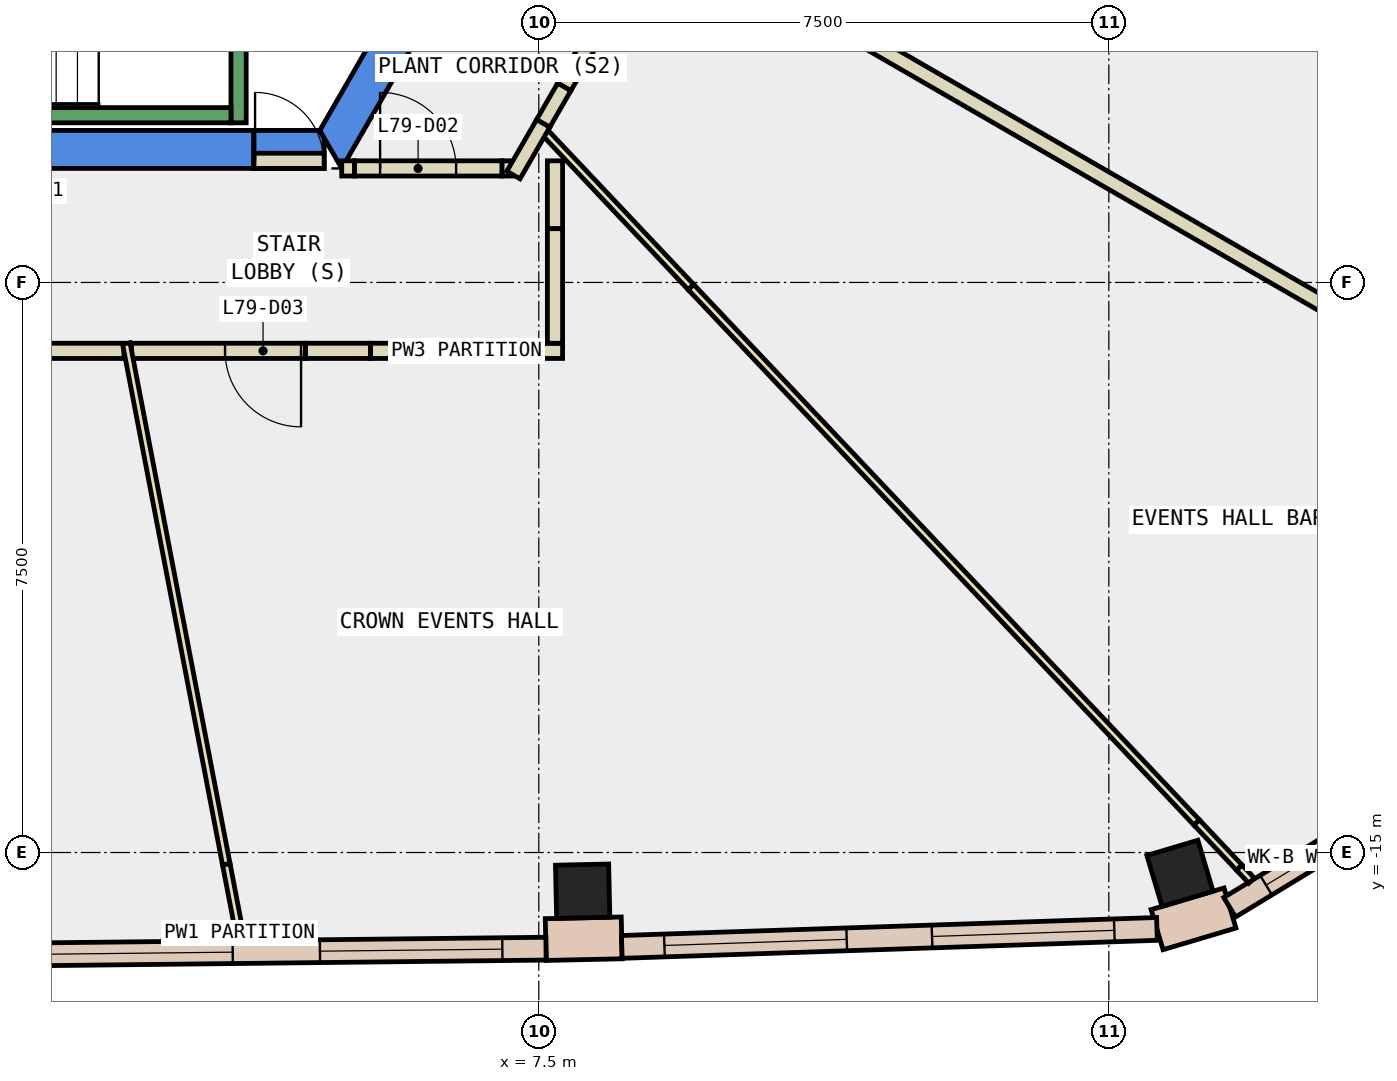
"""IFC4 building model, lengths in metres.
Left out: names, types, materials, properties, quantities, classifications, styles, units other than length and angle.
Written with IfcOpenShell. Run it as: python <this file> out.ifc"""

import sys

from ifc_helpers import new_model, si_unit, direction, frame, frame_2d, origin, origin_2d, place, context, subcontext, project, spatial, polyline, rectangle, outline, extrude, element, fill, save


model = new_model("IFC4")
c1 = context("Model", 3, precision=1e-05, world=origin(), true_north=direction((0.0, 1.0)))
c2 = subcontext(c1, "Body", "Model", "MODEL_VIEW")
j1 = project(units=[si_unit("LENGTHUNIT", "METRE"), si_unit("PLANEANGLEUNIT", "RADIAN")], contexts=[c1])
p1 = place(None, origin())
s1 = spatial("IfcSite", under=j1, at=p1, CompositionType="ELEMENT")
p2 = place(p1, origin())
s2 = spatial("IfcBuilding", under=s1, at=p2, CompositionType="ELEMENT")
p3 = place(p2, frame((0.0, 0.0, 335.9)))
s3 = spatial("IfcBuildingStorey", under=s2, at=p3, CompositionType="ELEMENT", Elevation=335.9)
for number, where, z_axis, x_axis in (
    (1, (8.077, -15.509, -0.35), (0.0, 0.0, 1.0), (1.0, 0.022, 0.0)),
    (2, (15.936, -15.274, -0.35), (0.0, 0.0, 1.0), (0.958, 0.286, 0.0)),
):
    element("IfcColumn", number, at=place(p3, frame(where, z_axis=z_axis, x_axis=x_axis)), inside=s3, PredefinedType="COLUMN", context=c2, shape_type="SweptSolid", body=[
        extrude(rectangle(XDim=0.7, YDim=0.7, at=origin_2d()), origin(), (0.0, 0.0, 1.0), 4.4),
    ])
p4 = place(p3, frame((0.0, 0.0, -0.35)))
e3 = element("IfcWall", 3, at=p4, inside=s3, PredefinedType="SHEAR", context=c2, shape_type="SweptSolid", body=[
    extrude(outline(polyline([(3.75, -6.0), (3.75, -5.5), (-4.619, -5.5), (-4.907, -6.0), (3.75, -6.0)])), origin(), (0.0, 0.0, 1.0), 4.4),
])
p5 = place(p3, frame((0.0, 0.0, 3.6)))
e4 = element("IfcWall", 4, at=p5, inside=s3, PredefinedType="SHEAR", context=c2, shape_type="SweptSolid", body=[
    extrude(outline(polyline([(4.676, -6.0), (4.676, -5.6), (4.619, -5.5), (3.75, -5.5), (3.75, -6.0), (4.676, -6.0)])), origin(), (0.0, 0.0, 1.0), 0.45),
])
p6 = place(p3, frame((0.0, 0.0, -0.35)))
e5 = element("IfcWall", 5, at=p6, inside=s3, PredefinedType="SHEAR", context=c2, shape_type="SweptSolid", body=[
    extrude(outline(polyline([(4.907, -6.0), (9.815, 2.5), (9.238, 2.5), (4.619, -5.5), (4.907, -6.0)])), origin(), (0.0, 0.0, 1.0), 4.4),
])
p7 = place(p3, frame((7.591, -16.145, 0.0), z_axis=(0.0, 0.0, 1.0), x_axis=(0.999758688564, 0.021967353997, 0.0)))
e6 = element("IfcWall", 6, at=p7, inside=s3, PredefinedType="STANDARD", context=c2, shape_type="SweptSolid", body=[
    extrude(rectangle(XDim=1.0, YDim=0.55, at=frame_2d((0.5, 0.0))), origin(), (0.0, 0.0, 1.0), 4.05),
])
p8 = place(p3, frame((15.635, -16.015, 0.0), z_axis=(0.0, 0.0, 1.0), x_axis=(0.958588587629, 0.284794521834, 0.0)))
e7 = element("IfcWall", 7, at=p8, inside=s3, PredefinedType="STANDARD", context=c2, shape_type="SweptSolid", body=[
    extrude(rectangle(XDim=1.0, YDim=0.55, at=frame_2d((0.5, 0.0))), origin(), (0.0, 0.0, 1.0), 4.05),
])
p9 = place(p3, frame((0.499, -16.344, 0.0), z_axis=(0.0, 0.0, 1.0), x_axis=(0.999937873213, 0.011146735624, 0.0)))
e8 = element("IfcWall", 8, at=p9, inside=s3, PredefinedType="STANDARD", context=c2, shape_type="SweptSolid", body=[
    extrude(rectangle(XDim=7.096, YDim=0.3, at=frame_2d((3.548, 0.0))), origin(), (0.0, 0.0, 1.0), 4.05),
])
p10 = place(p9, frame((0.574, 0.0, 0.9)))
e9 = element("IfcOpeningElement", 9, at=p10, cuts=e8, PredefinedType="OPENING", context=c2, shape_type="SweptSolid", body=[
    extrude(rectangle(XDim=2.4, YDim=3.0, at=frame_2d((1.2, 1.5))), frame((0.0, 0.16, 0.0), z_axis=(0.0, -1.0, 0.0), x_axis=(1.0, 0.0, 0.0)), (0.0, 0.0, 1.0), 0.32),
])
p11 = place(p9, frame((4.122, 0.0, 0.9)))
e10 = element("IfcOpeningElement", 10, at=p11, cuts=e8, PredefinedType="OPENING", context=c2, shape_type="SweptSolid", body=[
    extrude(rectangle(XDim=2.4, YDim=3.0, at=frame_2d((1.2, 1.5))), frame((0.0, 0.16, 0.0), z_axis=(0.0, -1.0, 0.0), x_axis=(1.0, 0.0, 0.0)), (0.0, 0.0, 1.0), 0.32),
])
p12 = place(p3, frame((8.592, -16.242, 0.0), z_axis=(0.0, 0.0, 1.0), x_axis=(0.999433696929, 0.033649449366, 0.0)))
e11 = element("IfcWall", 11, at=p12, inside=s3, PredefinedType="STANDARD", context=c2, shape_type="SweptSolid", body=[
    extrude(rectangle(XDim=7.045, YDim=0.3, at=frame_2d((3.522, 0.0))), origin(), (0.0, 0.0, 1.0), 4.05),
])
p13 = place(p12, frame((0.561, 0.0, 0.9)))
e12 = element("IfcOpeningElement", 12, at=p13, cuts=e11, PredefinedType="OPENING", context=c2, shape_type="SweptSolid", body=[
    extrude(rectangle(XDim=2.4, YDim=3.0, at=frame_2d((1.2, 1.5))), frame((0.0, 0.16, 0.0), z_axis=(0.0, -1.0, 0.0), x_axis=(1.0, 0.0, 0.0)), (0.0, 0.0, 1.0), 0.32),
])
p14 = place(p12, frame((4.084, 0.0, 0.9)))
e13 = element("IfcOpeningElement", 13, at=p14, cuts=e11, PredefinedType="OPENING", context=c2, shape_type="SweptSolid", body=[
    extrude(rectangle(XDim=2.4, YDim=3.0, at=frame_2d((1.2, 1.5))), frame((0.0, 0.16, 0.0), z_axis=(0.0, -1.0, 0.0), x_axis=(1.0, 0.0, 0.0)), (0.0, 0.0, 1.0), 0.32),
])
p15 = place(p3, frame((16.59, -15.72, 0.0), z_axis=(0.0, 0.0, 1.0), x_axis=(0.854607095238, 0.519275180197, 0.0)))
e14 = element("IfcWall", 14, at=p15, inside=s3, PredefinedType="STANDARD", context=c2, shape_type="SweptSolid", body=[
    extrude(rectangle(XDim=5.04, YDim=0.3, at=frame_2d((2.52, 0.0))), origin(), (0.0, 0.0, 1.0), 4.05),
])
p16 = place(p15, frame((0.56, 0.0, 0.9)))
e15 = element("IfcOpeningElement", 15, at=p16, cuts=e14, PredefinedType="OPENING", context=c2, shape_type="SweptSolid", body=[
    extrude(rectangle(XDim=1.4, YDim=3.0, at=frame_2d((0.7, 1.5))), frame((0.0, 0.16, 0.0), z_axis=(0.0, -1.0, 0.0), x_axis=(1.0, 0.0, 0.0)), (0.0, 0.0, 1.0), 0.32),
])
p17 = place(p15, frame((3.08, 0.0, 0.9)))
e16 = element("IfcOpeningElement", 16, at=p17, cuts=e14, PredefinedType="OPENING", context=c2, shape_type="SweptSolid", body=[
    extrude(rectangle(XDim=1.4, YDim=3.0, at=frame_2d((0.7, 1.5))), frame((0.0, 0.16, 0.0), z_axis=(0.0, -1.0, 0.0), x_axis=(1.0, 0.0, 0.0)), (0.0, 0.0, 1.0), 0.32),
])
p18 = place(p3, frame((4.907, -6.0, 0.0), z_axis=(0.0, 0.0, 1.0), x_axis=(1.0, 0.0, 0.0)))
e17 = element("IfcWall", 17, at=p18, inside=s3, PredefinedType="PARTITIONING", context=c2, shape_type="SweptSolid", body=[
    extrude(rectangle(XDim=0.169, YDim=0.2, at=frame_2d((0.084, 0.0))), origin(), (0.0, 0.0, 1.0), 2.4),
])
p19 = place(p3, frame((7.813, -8.4, 0.0), z_axis=(0.0, 0.0, 1.0), x_axis=(-1.0, 0.0, 0.0)))
e18 = element("IfcWall", 18, at=p19, inside=s3, PredefinedType="PARTITIONING", context=c2, shape_type="SweptSolid", body=[
    extrude(rectangle(XDim=2.528, YDim=0.2, at=frame_2d((1.264, 0.0))), origin(), (0.0, 0.0, 1.0), 4.05),
])
p20 = place(p3, frame((7.713, -5.9, 0.0), z_axis=(0.0, 0.0, 1.0), x_axis=(0.0, -1.0, 0.0)))
e19 = element("IfcWall", 19, at=p20, inside=s3, PredefinedType="PARTITIONING", context=c2, shape_type="SweptSolid", body=[
    extrude(rectangle(XDim=0.893, YDim=0.2, at=frame_2d((0.447, 0.0))), origin(), (0.0, 0.0, 1.0), 1.95),
])
p21 = place(p3, frame((2.042, -8.4, 0.0), z_axis=(0.0, 0.0, 1.0), x_axis=(-1.0, 0.0, 0.0)))
e20 = element("IfcWall", 20, at=p21, inside=s3, PredefinedType="PARTITIONING", context=c2, shape_type="SweptSolid", body=[
    extrude(rectangle(XDim=1.429, YDim=0.2, at=frame_2d((0.714, 0.0))), origin(), (0.0, 0.0, 1.0), 4.05),
])
p22 = place(p3, frame((3.581, -16.159, 0.0), z_axis=(0.0, 0.0, 1.0), x_axis=(-0.186880008506, 0.982382747416, 0.0)))
e21 = element("IfcWall", 21, at=p22, inside=s3, PredefinedType="PARTITIONING", context=c2, shape_type="SweptSolid", body=[
    extrude(rectangle(XDim=0.193, YDim=0.1, at=frame_2d((0.097, 0.0))), origin(), (0.0, 0.0, 1.0), 4.05),
])
p23 = place(p3, frame((7.524, -5.467, 0.0), z_axis=(0.0, 0.0, 1.0), x_axis=(0.686690726235, -0.726949686363, 0.0)))
e22 = element("IfcWall", 22, at=p23, inside=s3, PredefinedType="PARTITIONING", context=c2, shape_type="SweptSolid", body=[
    extrude(rectangle(XDim=2.881, YDim=0.1, at=frame_2d((1.44, 0.0))), origin(), (0.0, 0.0, 1.0), 1.95),
])
p24 = place(p3, frame((9.006, -2.7, 0.0), z_axis=(0.0, 0.0, 1.0), x_axis=(0.86601643423, -0.500015535402, 0.0)))
e23 = element("IfcWall", 23, at=p24, inside=s3, PredefinedType="PARTITIONING", context=c2, shape_type="SweptSolid", body=[
    extrude(rectangle(XDim=13.147, YDim=0.2, at=frame_2d((6.574, 0.0))), origin(), (0.0, 0.0, 1.0), 4.05),
])
p25 = place(p3, frame((3.75, -5.9, 0.0), z_axis=(0.0, 0.0, 1.0), x_axis=(1.0, 0.0, 0.0)))
e24 = element("IfcWall", 24, at=p25, inside=s3, PredefinedType="PARTITIONING", context=c2, shape_type="SweptSolid", body=[
    extrude(rectangle(XDim=0.926, YDim=0.2, at=frame_2d((0.463, 0.0))), origin(), (0.0, 0.0, 1.0), 2.4),
])
p26 = place(p25, frame((0.017, 0.0, 0.0)))
e25 = element("IfcOpeningElement", 25, at=p26, cuts=e24, PredefinedType="OPENING", context=c2, shape_type="SweptSolid", body=[
    extrude(rectangle(XDim=0.9, YDim=2.1, at=frame_2d((0.45, 1.05))), frame((0.0, 0.11, 0.0), z_axis=(0.0, -1.0, 0.0), x_axis=(1.0, 0.0, 0.0)), (0.0, 0.0, 1.0), 0.22),
])
p27 = place(p3, frame((5.076, -6.0, 0.0), z_axis=(0.0, 0.0, 1.0), x_axis=(1.0, 0.0, 0.0)))
e26 = element("IfcWall", 26, at=p27, inside=s3, PredefinedType="PARTITIONING", context=c2, shape_type="SweptSolid", body=[
    extrude(rectangle(XDim=1.941, YDim=0.2, at=frame_2d((0.971, 0.0))), origin(), (0.0, 0.0, 1.0), 4.05),
])
p28 = place(p27, frame((0.336, 0.0, 0.0)))
e27 = element("IfcOpeningElement", 27, at=p28, cuts=e26, PredefinedType="OPENING", context=c2, shape_type="SweptSolid", body=[
    extrude(rectangle(XDim=1.0, YDim=2.1, at=frame_2d((0.5, 1.05))), frame((0.0, 0.11, 0.0), z_axis=(0.0, -1.0, 0.0), x_axis=(1.0, 0.0, 0.0)), (0.0, 0.0, 1.0), 0.22),
])
p29 = place(p3, frame((7.017, -6.0, 0.0), z_axis=(0.0, 0.0, 1.0), x_axis=(1.0, 0.0, 0.0)))
e28 = element("IfcWall", 28, at=p29, inside=s3, PredefinedType="PARTITIONING", context=c2, shape_type="SweptSolid", body=[
    extrude(rectangle(XDim=0.144, YDim=0.2, at=frame_2d((0.072, 0.0))), origin(), (0.0, 0.0, 1.0), 1.95),
])
p30 = place(p3, frame((5.285, -8.4, 0.0), z_axis=(0.0, 0.0, 1.0), x_axis=(-1.0, 0.0, 0.0)))
e29 = element("IfcWall", 29, at=p30, inside=s3, PredefinedType="PARTITIONING", context=c2, shape_type="SweptSolid", body=[
    extrude(rectangle(XDim=0.856, YDim=0.2, at=frame_2d((0.428, 0.0))), origin(), (0.0, 0.0, 1.0), 1.95),
])
p31 = place(p3, frame((4.429, -8.4, 0.0), z_axis=(0.0, 0.0, 1.0), x_axis=(-1.0, 0.0, 0.0)))
e30 = element("IfcWall", 30, at=p31, inside=s3, PredefinedType="PARTITIONING", context=c2, shape_type="SweptSolid", body=[
    extrude(rectangle(XDim=2.287, YDim=0.2, at=frame_2d((1.144, 0.0))), origin(), (0.0, 0.0, 1.0), 4.05),
])
p32 = place(p31, frame((0.057, 0.0, 0.0)))
e31 = element("IfcOpeningElement", 31, at=p32, cuts=e30, PredefinedType="OPENING", context=c2, shape_type="SweptSolid", body=[
    extrude(rectangle(XDim=1.0, YDim=2.1, at=frame_2d((0.5, 1.05))), frame((0.0, 0.11, 0.0), z_axis=(0.0, -1.0, 0.0), x_axis=(1.0, 0.0, 0.0)), (0.0, 0.0, 1.0), 0.22),
])
p33 = place(p3, frame((7.713, -6.793, 0.0), z_axis=(0.0, 0.0, 1.0), x_axis=(0.0, -1.0, 0.0)))
e32 = element("IfcWall", 32, at=p33, inside=s3, PredefinedType="PARTITIONING", context=c2, shape_type="SweptSolid", body=[
    extrude(rectangle(XDim=1.507, YDim=0.2, at=frame_2d((0.753, 0.0))), origin(), (0.0, 0.0, 1.0), 4.05),
])
p34 = place(p3, frame((8.185, -4.322, 0.0), z_axis=(0.0, 0.0, 1.0), x_axis=(-0.500265973451, -0.865871789474, 0.0)))
e33 = element("IfcWall", 33, at=p34, inside=s3, PredefinedType="PARTITIONING", context=c2, shape_type="SweptSolid", body=[
    extrude(rectangle(XDim=0.7, YDim=0.2, at=frame_2d((0.35, 0.0))), origin(), (0.0, 0.0, 1.0), 1.95),
])
p35 = place(p3, frame((7.835, -4.928, 0.0), z_axis=(0.0, 0.0, 1.0), x_axis=(-0.499646164767, -0.866229594296, 0.0)))
e34 = element("IfcWall", 34, at=p35, inside=s3, PredefinedType="PARTITIONING", context=c2, shape_type="SweptSolid", body=[
    extrude(rectangle(XDim=0.554, YDim=0.2, at=frame_2d((0.277, 0.0))), origin(), (0.0, 0.0, 1.0), 4.05),
])
p36 = place(p3, frame((7.558, -5.408, 0.0), z_axis=(0.0, 0.0, 1.0), x_axis=(-0.500090821976, -0.865972961342, 0.0)))
e35 = element("IfcWall", 35, at=p36, inside=s3, PredefinedType="PARTITIONING", context=c2, shape_type="SweptSolid", body=[
    extrude(rectangle(XDim=0.784, YDim=0.2, at=frame_2d((0.392, 0.0))), origin(), (0.0, 0.0, 1.0), 1.95),
])
p37 = place(p3, frame((3.545, -15.969, 0.0), z_axis=(0.0, 0.0, 1.0), x_axis=(-0.188934578713, 0.981989676609, 0.0)))
e36 = element("IfcWall", 36, at=p37, inside=s3, PredefinedType="PARTITIONING", context=c2, shape_type="SweptSolid", body=[
    extrude(rectangle(XDim=0.831, YDim=0.1, at=frame_2d((0.416, 0.0))), origin(), (0.0, 0.0, 1.0), 1.95),
])
p38 = place(p3, frame((3.388, -15.153, 0.0), z_axis=(0.0, 0.0, 1.0), x_axis=(-0.18849172388, 0.982074778227, 0.0)))
e37 = element("IfcWall", 37, at=p38, inside=s3, PredefinedType="PARTITIONING", context=c2, shape_type="SweptSolid", body=[
    extrude(rectangle(XDim=6.976, YDim=0.1, at=frame_2d((3.488, 0.0))), origin(), (0.0, 0.0, 1.0), 4.05),
])
p39 = place(p3, frame((9.502, -7.561, 0.0), z_axis=(0.0, 0.0, 1.0), x_axis=(0.686701951344, -0.726939082744, 0.0)))
e38 = element("IfcWall", 38, at=p39, inside=s3, PredefinedType="PARTITIONING", context=c2, shape_type="SweptSolid", body=[
    extrude(rectangle(XDim=9.69, YDim=0.1, at=frame_2d((4.845, 0.0))), origin(), (0.0, 0.0, 1.0), 4.05),
])
p40 = place(p3, frame((16.156, -14.605, 0.0), z_axis=(0.0, 0.0, 1.0), x_axis=(0.686649854496, -0.726988292423, 0.0)))
e39 = element("IfcWall", 39, at=p40, inside=s3, PredefinedType="PARTITIONING", context=c2, shape_type="SweptSolid", body=[
    extrude(rectangle(XDim=0.817, YDim=0.1, at=frame_2d((0.409, 0.0))), origin(), (0.0, 0.0, 1.0), 1.95),
])
p41 = place(p3, frame((16.717, -15.199, 0.0), z_axis=(0.0, 0.0, 1.0), x_axis=(0.684943115963, -0.728596546722, 0.0)))
e40 = element("IfcWall", 40, at=p41, inside=s3, PredefinedType="PARTITIONING", context=c2, shape_type="SweptSolid", body=[
    extrude(rectangle(XDim=0.235, YDim=0.1, at=frame_2d((0.117, 0.0))), origin(), (0.0, 0.0, 1.0), 4.05),
])
p42 = place(p3, frame((3.55, -2.667, 0.0), z_axis=(0.0, 0.0, 1.0), x_axis=(0.0, -1.0, 0.0)))
e41 = element("IfcWall", 41, at=p42, inside=s3, PredefinedType="STANDARD", context=c2, shape_type="SweptSolid", body=[
    extrude(rectangle(XDim=2.733, YDim=0.2, at=frame_2d((1.366, 0.0))), origin(), (0.0, 0.0, 1.0), 4.05),
])
p43 = place(p3, frame((-3.45, -5.3, 0.0), z_axis=(0.0, 0.0, 1.0), x_axis=(1.0, 0.0, 0.0)))
e42 = element("IfcWall", 42, at=p43, inside=s3, PredefinedType="STANDARD", context=c2, shape_type="SweptSolid", body=[
    extrude(rectangle(XDim=6.9, YDim=0.2, at=frame_2d((3.45, 0.0))), origin(), (0.0, 0.0, 1.0), 4.05),
])
p44 = place(p10, origin())
e43 = element("IfcWindow", 43, at=p44, inside=s3, PartitioningType="SINGLE_PANEL", PredefinedType="WINDOW", context=c2, shape_type="SweptSolid", body=[
    extrude(rectangle(XDim=2.4, YDim=3.0, at=frame_2d((1.2, 1.5))), frame((0.0, 0.03, 0.0), z_axis=(0.0, -1.0, 0.0), x_axis=(1.0, 0.0, 0.0)), (0.0, 0.0, 1.0), 0.06),
])
fill(e9, e43)
p45 = place(p11, origin())
e44 = element("IfcWindow", 44, at=p45, inside=s3, PartitioningType="SINGLE_PANEL", PredefinedType="WINDOW", context=c2, shape_type="SweptSolid", body=[
    extrude(rectangle(XDim=2.4, YDim=3.0, at=frame_2d((1.2, 1.5))), frame((0.0, 0.03, 0.0), z_axis=(0.0, -1.0, 0.0), x_axis=(1.0, 0.0, 0.0)), (0.0, 0.0, 1.0), 0.06),
])
fill(e10, e44)
p46 = place(p13, origin())
e45 = element("IfcWindow", 45, at=p46, inside=s3, PartitioningType="SINGLE_PANEL", PredefinedType="WINDOW", context=c2, shape_type="SweptSolid", body=[
    extrude(rectangle(XDim=2.4, YDim=3.0, at=frame_2d((1.2, 1.5))), frame((0.0, 0.03, 0.0), z_axis=(0.0, -1.0, 0.0), x_axis=(1.0, 0.0, 0.0)), (0.0, 0.0, 1.0), 0.06),
])
fill(e12, e45)
p47 = place(p14, origin())
e46 = element("IfcWindow", 46, at=p47, inside=s3, PartitioningType="SINGLE_PANEL", PredefinedType="WINDOW", context=c2, shape_type="SweptSolid", body=[
    extrude(rectangle(XDim=2.4, YDim=3.0, at=frame_2d((1.2, 1.5))), frame((0.0, 0.03, 0.0), z_axis=(0.0, -1.0, 0.0), x_axis=(1.0, 0.0, 0.0)), (0.0, 0.0, 1.0), 0.06),
])
fill(e13, e46)
p48 = place(p16, origin())
e47 = element("IfcWindow", 47, at=p48, inside=s3, PartitioningType="SINGLE_PANEL", PredefinedType="WINDOW", context=c2, shape_type="SweptSolid", body=[
    extrude(rectangle(XDim=1.4, YDim=3.0, at=frame_2d((0.7, 1.5))), frame((0.0, 0.03, 0.0), z_axis=(0.0, -1.0, 0.0), x_axis=(1.0, 0.0, 0.0)), (0.0, 0.0, 1.0), 0.06),
])
fill(e15, e47)
p49 = place(p28, origin())
e48 = element("IfcDoor", 48, at=p49, inside=s3, OperationType="SINGLE_SWING_RIGHT", PredefinedType="DOOR", context=c2, shape_type="SweptSolid", body=[
    extrude(rectangle(XDim=1.0, YDim=2.1, at=frame_2d((0.5, 1.05))), frame((0.0, 0.025, 0.0), z_axis=(0.0, -1.0, 0.0), x_axis=(1.0, 0.0, 0.0)), (0.0, 0.0, 1.0), 0.05),
])
fill(e27, e48)
p50 = place(p32, origin())
e49 = element("IfcDoor", 49, at=p50, inside=s3, OperationType="SINGLE_SWING_LEFT", PredefinedType="DOOR", context=c2, shape_type="SweptSolid", body=[
    extrude(rectangle(XDim=1.0, YDim=2.1, at=frame_2d((0.5, 1.05))), frame((0.0, 0.025, 0.0), z_axis=(0.0, -1.0, 0.0), x_axis=(1.0, 0.0, 0.0)), (0.0, 0.0, 1.0), 0.05),
])
fill(e31, e49)
p51 = place(p26, origin())
e50 = element("IfcDoor", 50, at=p51, inside=s3, OperationType="SINGLE_SWING_LEFT", PredefinedType="DOOR", context=c2, shape_type="SweptSolid", body=[
    extrude(rectangle(XDim=0.9, YDim=2.1, at=frame_2d((0.45, 1.05))), frame((0.0, 0.025, 0.0), z_axis=(0.0, -1.0, 0.0), x_axis=(1.0, 0.0, 0.0)), (0.0, 0.0, 1.0), 0.05),
])
fill(e25, e50)
save(model, sys.argv[1])
